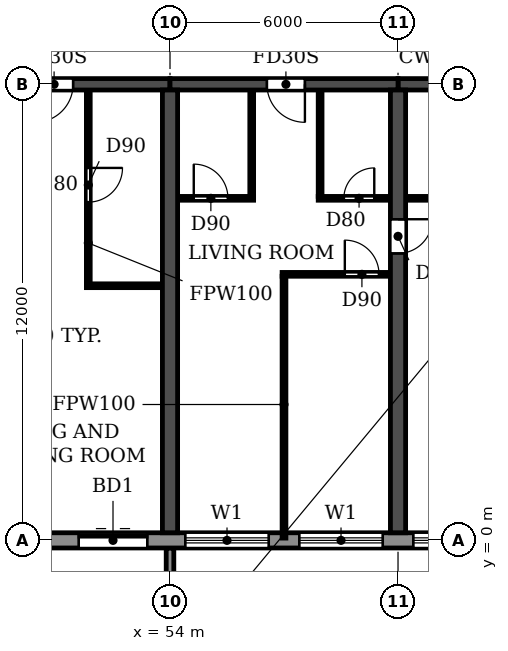
"""IFC4 building model, lengths in metres.
Left out: names, types, materials, properties, quantities, classifications, styles, units other than length and angle.
Written with IfcOpenShell. Run it as: python <this file> out.ifc"""

import sys

from ifc_helpers import new_model, si_unit, direction, frame, frame_2d, origin, place, context, subcontext, project, spatial, polyline, rectangle, outline, extrude, source, transform, mapped, element, fill, save


model = new_model("IFC4")
c1 = context("Model", 3, precision=1e-05, world=origin(), true_north=direction((0.0, 1.0)))
c2 = subcontext(c1, "Body", "Model", "MODEL_VIEW")
j1 = project(units=[si_unit("LENGTHUNIT", "METRE"), si_unit("PLANEANGLEUNIT", "RADIAN")], contexts=[c1])
p1 = place(None, origin())
s1 = spatial("IfcSite", under=j1, at=p1, CompositionType="ELEMENT")
p2 = place(p1, origin())
s2 = spatial("IfcBuilding", under=s1, at=p2, CompositionType="ELEMENT")
p3 = place(p2, frame((0.0, 0.0, 56.4)))
s3 = spatial("IfcBuildingStorey", under=s2, at=p3, CompositionType="ELEMENT", Elevation=56.4)
p4 = place(p3, frame((54.0, 0.2, 0.0), z_axis=(0.0, 0.0, 1.0), x_axis=(0.0, 1.0, 0.0)))
e1 = element("IfcWall", 1, at=p4, inside=s3, PredefinedType="SHEAR", context=c2, shape_type="SweptSolid", body=[
    extrude(rectangle(XDim=11.65, YDim=0.4, at=frame_2d((5.825, 0.0))), origin(), (0.0, 0.0, 1.0), 3.05),
])
p5 = place(p3, frame((60.0, 0.2, 0.0), z_axis=(0.0, 0.0, 1.0), x_axis=(0.0, 1.0, 0.0)))
e2 = element("IfcWall", 2, at=p5, inside=s3, PredefinedType="SHEAR", context=c2, shape_type="SweptSolid", body=[
    extrude(rectangle(XDim=11.65, YDim=0.4, at=frame_2d((5.825, 0.0))), origin(), (0.0, 0.0, 1.0), 3.05),
])
p6 = place(p5, frame((7.35, 0.0, 0.0)))
e3 = element("IfcOpeningElement", 3, at=p6, cuts=e2, PredefinedType="OPENING", context=c2, shape_type="SweptSolid", body=[
    extrude(rectangle(XDim=0.9, YDim=2.1, at=frame_2d((0.45, 1.05))), frame((0.0, 0.21, 0.0), z_axis=(0.0, -1.0, 0.0), x_axis=(1.0, 0.0, 0.0)), (0.0, 0.0, 1.0), 0.42),
])
p7 = place(p3, frame((48.0, 12.0, 0.0), z_axis=(0.0, 0.0, 1.0), x_axis=(1.0, 0.0, 0.0)))
e4 = element("IfcWall", 4, at=p7, inside=s3, PredefinedType="SHEAR", context=c2, shape_type="SweptSolid", body=[
    extrude(rectangle(XDim=6.0, YDim=0.3, at=frame_2d((3.0, 0.0))), origin(), (0.0, 0.0, 1.0), 2.45),
])
p8 = place(p7, frame((2.45, 0.0, 0.0)))
e5 = element("IfcOpeningElement", 5, at=p8, cuts=e4, PredefinedType="OPENING", context=c2, shape_type="SweptSolid", body=[
    extrude(rectangle(XDim=1.0, YDim=2.1, at=frame_2d((0.5, 1.05))), frame((0.0, 0.16, 0.0), z_axis=(0.0, -1.0, 0.0), x_axis=(1.0, 0.0, 0.0)), (0.0, 0.0, 1.0), 0.32),
])
p9 = place(p3, frame((54.0, 12.0, 0.0), z_axis=(0.0, 0.0, 1.0), x_axis=(1.0, 0.0, 0.0)))
e6 = element("IfcWall", 6, at=p9, inside=s3, PredefinedType="SHEAR", context=c2, shape_type="SweptSolid", body=[
    extrude(rectangle(XDim=6.0, YDim=0.3, at=frame_2d((3.0, 0.0))), origin(), (0.0, 0.0, 1.0), 2.45),
])
p10 = place(p9, frame((2.55, 0.0, 0.0)))
e7 = element("IfcOpeningElement", 7, at=p10, cuts=e6, PredefinedType="OPENING", context=c2, shape_type="SweptSolid", body=[
    extrude(rectangle(XDim=1.0, YDim=2.1, at=frame_2d((0.5, 1.05))), frame((0.0, 0.16, 0.0), z_axis=(0.0, -1.0, 0.0), x_axis=(1.0, 0.0, 0.0)), (0.0, 0.0, 1.0), 0.32),
])
p11 = place(p3, frame((60.0, 12.0, 0.0), z_axis=(0.0, 0.0, 1.0), x_axis=(1.0, 0.0, 0.0)))
e8 = element("IfcWall", 8, at=p11, inside=s3, PredefinedType="SHEAR", context=c2, shape_type="SweptSolid", body=[
    extrude(rectangle(XDim=6.0, YDim=0.3, at=frame_2d((3.0, 0.0))), origin(), (0.0, 0.0, 1.0), 2.45),
])
p12 = place(p3, frame((10.683, 0.0, 0.0), z_axis=(0.0, 0.0, 1.0), x_axis=(1.0, 0.0, 0.0)))
e9 = element("IfcWall", 9, at=p12, inside=s3, PredefinedType="STANDARD", context=c2, shape_type="SweptSolid", body=[
    extrude(rectangle(XDim=80.634, YDim=0.4, at=frame_2d((40.317, 0.0))), origin(), (0.0, 0.0, 1.0), 3.05),
])
p13 = place(p12, frame((1.717, 0.0, 0.9)))
e10 = element("IfcOpeningElement", 10, at=p13, cuts=e9, PredefinedType="OPENING", context=c2, shape_type="SweptSolid", body=[
    extrude(rectangle(XDim=2.2, YDim=1.5, at=frame_2d((1.1, 0.75))), frame((0.0, 0.21, 0.0), z_axis=(0.0, -1.0, 0.0), x_axis=(1.0, 0.0, 0.0)), (0.0, 0.0, 1.0), 0.42),
])
p14 = place(p12, frame((4.917, 0.0, 0.0)))
e11 = element("IfcOpeningElement", 11, at=p14, cuts=e9, PredefinedType="OPENING", context=c2, shape_type="SweptSolid", body=[
    extrude(rectangle(XDim=1.8, YDim=2.4, at=frame_2d((0.9, 1.2))), frame((0.0, 0.21, 0.0), z_axis=(0.0, -1.0, 0.0), x_axis=(1.0, 0.0, 0.0)), (0.0, 0.0, 1.0), 0.42),
])
p15 = place(p12, frame((7.717, 0.0, 0.9)))
e12 = element("IfcOpeningElement", 12, at=p15, cuts=e9, PredefinedType="OPENING", context=c2, shape_type="SweptSolid", body=[
    extrude(rectangle(XDim=2.2, YDim=1.5, at=frame_2d((1.1, 0.75))), frame((0.0, 0.21, 0.0), z_axis=(0.0, -1.0, 0.0), x_axis=(1.0, 0.0, 0.0)), (0.0, 0.0, 1.0), 0.42),
])
p16 = place(p12, frame((10.717, 0.0, 0.9)))
e13 = element("IfcOpeningElement", 13, at=p16, cuts=e9, PredefinedType="OPENING", context=c2, shape_type="SweptSolid", body=[
    extrude(rectangle(XDim=2.2, YDim=1.5, at=frame_2d((1.1, 0.75))), frame((0.0, 0.21, 0.0), z_axis=(0.0, -1.0, 0.0), x_axis=(1.0, 0.0, 0.0)), (0.0, 0.0, 1.0), 0.42),
])
p17 = place(p12, frame((13.717, 0.0, 0.9)))
e14 = element("IfcOpeningElement", 14, at=p17, cuts=e9, PredefinedType="OPENING", context=c2, shape_type="SweptSolid", body=[
    extrude(rectangle(XDim=2.2, YDim=1.5, at=frame_2d((1.1, 0.75))), frame((0.0, 0.21, 0.0), z_axis=(0.0, -1.0, 0.0), x_axis=(1.0, 0.0, 0.0)), (0.0, 0.0, 1.0), 0.42),
])
p18 = place(p12, frame((16.917, 0.0, 0.0)))
e15 = element("IfcOpeningElement", 15, at=p18, cuts=e9, PredefinedType="OPENING", context=c2, shape_type="SweptSolid", body=[
    extrude(rectangle(XDim=1.8, YDim=2.4, at=frame_2d((0.9, 1.2))), frame((0.0, 0.21, 0.0), z_axis=(0.0, -1.0, 0.0), x_axis=(1.0, 0.0, 0.0)), (0.0, 0.0, 1.0), 0.42),
])
p19 = place(p12, frame((19.717, 0.0, 0.9)))
e16 = element("IfcOpeningElement", 16, at=p19, cuts=e9, PredefinedType="OPENING", context=c2, shape_type="SweptSolid", body=[
    extrude(rectangle(XDim=2.2, YDim=1.5, at=frame_2d((1.1, 0.75))), frame((0.0, 0.21, 0.0), z_axis=(0.0, -1.0, 0.0), x_axis=(1.0, 0.0, 0.0)), (0.0, 0.0, 1.0), 0.42),
])
p20 = place(p12, frame((22.717, 0.0, 0.9)))
e17 = element("IfcOpeningElement", 17, at=p20, cuts=e9, PredefinedType="OPENING", context=c2, shape_type="SweptSolid", body=[
    extrude(rectangle(XDim=2.2, YDim=1.5, at=frame_2d((1.1, 0.75))), frame((0.0, 0.21, 0.0), z_axis=(0.0, -1.0, 0.0), x_axis=(1.0, 0.0, 0.0)), (0.0, 0.0, 1.0), 0.42),
])
p21 = place(p12, frame((25.917, 0.0, 0.0)))
e18 = element("IfcOpeningElement", 18, at=p21, cuts=e9, PredefinedType="OPENING", context=c2, shape_type="SweptSolid", body=[
    extrude(rectangle(XDim=1.8, YDim=2.4, at=frame_2d((0.9, 1.2))), frame((0.0, 0.21, 0.0), z_axis=(0.0, -1.0, 0.0), x_axis=(1.0, 0.0, 0.0)), (0.0, 0.0, 1.0), 0.42),
])
p22 = place(p12, frame((28.717, 0.0, 0.9)))
e19 = element("IfcOpeningElement", 19, at=p22, cuts=e9, PredefinedType="OPENING", context=c2, shape_type="SweptSolid", body=[
    extrude(rectangle(XDim=2.2, YDim=1.5, at=frame_2d((1.1, 0.75))), frame((0.0, 0.21, 0.0), z_axis=(0.0, -1.0, 0.0), x_axis=(1.0, 0.0, 0.0)), (0.0, 0.0, 1.0), 0.42),
])
p23 = place(p12, frame((31.717, 0.0, 0.9)))
e20 = element("IfcOpeningElement", 20, at=p23, cuts=e9, PredefinedType="OPENING", context=c2, shape_type="SweptSolid", body=[
    extrude(rectangle(XDim=2.2, YDim=1.5, at=frame_2d((1.1, 0.75))), frame((0.0, 0.21, 0.0), z_axis=(0.0, -1.0, 0.0), x_axis=(1.0, 0.0, 0.0)), (0.0, 0.0, 1.0), 0.42),
])
p24 = place(p12, frame((34.717, 0.0, 0.9)))
e21 = element("IfcOpeningElement", 21, at=p24, cuts=e9, PredefinedType="OPENING", context=c2, shape_type="SweptSolid", body=[
    extrude(rectangle(XDim=2.2, YDim=1.5, at=frame_2d((1.1, 0.75))), frame((0.0, 0.21, 0.0), z_axis=(0.0, -1.0, 0.0), x_axis=(1.0, 0.0, 0.0)), (0.0, 0.0, 1.0), 0.42),
])
p25 = place(p12, frame((37.717, 0.0, 0.9)))
e22 = element("IfcOpeningElement", 22, at=p25, cuts=e9, PredefinedType="OPENING", context=c2, shape_type="SweptSolid", body=[
    extrude(rectangle(XDim=2.2, YDim=1.5, at=frame_2d((1.1, 0.75))), frame((0.0, 0.21, 0.0), z_axis=(0.0, -1.0, 0.0), x_axis=(1.0, 0.0, 0.0)), (0.0, 0.0, 1.0), 0.42),
])
p26 = place(p12, frame((40.917, 0.0, 0.0)))
e23 = element("IfcOpeningElement", 23, at=p26, cuts=e9, PredefinedType="OPENING", context=c2, shape_type="SweptSolid", body=[
    extrude(rectangle(XDim=1.8, YDim=2.4, at=frame_2d((0.9, 1.2))), frame((0.0, 0.21, 0.0), z_axis=(0.0, -1.0, 0.0), x_axis=(1.0, 0.0, 0.0)), (0.0, 0.0, 1.0), 0.42),
])
p27 = place(p12, frame((43.717, 0.0, 0.9)))
e24 = element("IfcOpeningElement", 24, at=p27, cuts=e9, PredefinedType="OPENING", context=c2, shape_type="SweptSolid", body=[
    extrude(rectangle(XDim=2.2, YDim=1.5, at=frame_2d((1.1, 0.75))), frame((0.0, 0.21, 0.0), z_axis=(0.0, -1.0, 0.0), x_axis=(1.0, 0.0, 0.0)), (0.0, 0.0, 1.0), 0.42),
])
p28 = place(p12, frame((46.717, 0.0, 0.9)))
e25 = element("IfcOpeningElement", 25, at=p28, cuts=e9, PredefinedType="OPENING", context=c2, shape_type="SweptSolid", body=[
    extrude(rectangle(XDim=2.2, YDim=1.5, at=frame_2d((1.1, 0.75))), frame((0.0, 0.21, 0.0), z_axis=(0.0, -1.0, 0.0), x_axis=(1.0, 0.0, 0.0)), (0.0, 0.0, 1.0), 0.42),
])
p29 = place(p12, frame((49.717, 0.0, 0.9)))
e26 = element("IfcOpeningElement", 26, at=p29, cuts=e9, PredefinedType="OPENING", context=c2, shape_type="SweptSolid", body=[
    extrude(rectangle(XDim=2.2, YDim=1.5, at=frame_2d((1.1, 0.75))), frame((0.0, 0.21, 0.0), z_axis=(0.0, -1.0, 0.0), x_axis=(1.0, 0.0, 0.0)), (0.0, 0.0, 1.0), 0.42),
])
p30 = place(p12, frame((52.717, 0.0, 0.9)))
e27 = element("IfcOpeningElement", 27, at=p30, cuts=e9, PredefinedType="OPENING", context=c2, shape_type="SweptSolid", body=[
    extrude(rectangle(XDim=2.2, YDim=1.5, at=frame_2d((1.1, 0.75))), frame((0.0, 0.21, 0.0), z_axis=(0.0, -1.0, 0.0), x_axis=(1.0, 0.0, 0.0)), (0.0, 0.0, 1.0), 0.42),
])
p31 = place(p12, frame((55.717, 0.0, 0.9)))
e28 = element("IfcOpeningElement", 28, at=p31, cuts=e9, PredefinedType="OPENING", context=c2, shape_type="SweptSolid", body=[
    extrude(rectangle(XDim=2.2, YDim=1.5, at=frame_2d((1.1, 0.75))), frame((0.0, 0.21, 0.0), z_axis=(0.0, -1.0, 0.0), x_axis=(1.0, 0.0, 0.0)), (0.0, 0.0, 1.0), 0.42),
])
p32 = place(p12, frame((58.717, 0.0, 0.9)))
e29 = element("IfcOpeningElement", 29, at=p32, cuts=e9, PredefinedType="OPENING", context=c2, shape_type="SweptSolid", body=[
    extrude(rectangle(XDim=2.2, YDim=1.5, at=frame_2d((1.1, 0.75))), frame((0.0, 0.21, 0.0), z_axis=(0.0, -1.0, 0.0), x_axis=(1.0, 0.0, 0.0)), (0.0, 0.0, 1.0), 0.42),
])
p33 = place(p12, frame((61.717, 0.0, 0.9)))
e30 = element("IfcOpeningElement", 30, at=p33, cuts=e9, PredefinedType="OPENING", context=c2, shape_type="SweptSolid", body=[
    extrude(rectangle(XDim=2.2, YDim=1.5, at=frame_2d((1.1, 0.75))), frame((0.0, 0.21, 0.0), z_axis=(0.0, -1.0, 0.0), x_axis=(1.0, 0.0, 0.0)), (0.0, 0.0, 1.0), 0.42),
])
p34 = place(p12, frame((64.917, 0.0, 0.0)))
e31 = element("IfcOpeningElement", 31, at=p34, cuts=e9, PredefinedType="OPENING", context=c2, shape_type="SweptSolid", body=[
    extrude(rectangle(XDim=1.8, YDim=2.4, at=frame_2d((0.9, 1.2))), frame((0.0, 0.21, 0.0), z_axis=(0.0, -1.0, 0.0), x_axis=(1.0, 0.0, 0.0)), (0.0, 0.0, 1.0), 0.42),
])
p35 = place(p12, frame((67.717, 0.0, 0.9)))
e32 = element("IfcOpeningElement", 32, at=p35, cuts=e9, PredefinedType="OPENING", context=c2, shape_type="SweptSolid", body=[
    extrude(rectangle(XDim=2.2, YDim=1.5, at=frame_2d((1.1, 0.75))), frame((0.0, 0.21, 0.0), z_axis=(0.0, -1.0, 0.0), x_axis=(1.0, 0.0, 0.0)), (0.0, 0.0, 1.0), 0.42),
])
p36 = place(p12, frame((70.717, 0.0, 0.9)))
e33 = element("IfcOpeningElement", 33, at=p36, cuts=e9, PredefinedType="OPENING", context=c2, shape_type="SweptSolid", body=[
    extrude(rectangle(XDim=2.2, YDim=1.5, at=frame_2d((1.1, 0.75))), frame((0.0, 0.21, 0.0), z_axis=(0.0, -1.0, 0.0), x_axis=(1.0, 0.0, 0.0)), (0.0, 0.0, 1.0), 0.42),
])
p37 = place(p12, frame((73.717, 0.0, 0.9)))
e34 = element("IfcOpeningElement", 34, at=p37, cuts=e9, PredefinedType="OPENING", context=c2, shape_type="SweptSolid", body=[
    extrude(rectangle(XDim=2.2, YDim=1.5, at=frame_2d((1.1, 0.75))), frame((0.0, 0.21, 0.0), z_axis=(0.0, -1.0, 0.0), x_axis=(1.0, 0.0, 0.0)), (0.0, 0.0, 1.0), 0.42),
])
p38 = place(p12, frame((76.917, 0.0, 0.0)))
e35 = element("IfcOpeningElement", 35, at=p38, cuts=e9, PredefinedType="OPENING", context=c2, shape_type="SweptSolid", body=[
    extrude(rectangle(XDim=1.8, YDim=2.4, at=frame_2d((0.9, 1.2))), frame((0.0, 0.21, 0.0), z_axis=(0.0, -1.0, 0.0), x_axis=(1.0, 0.0, 0.0)), (0.0, 0.0, 1.0), 0.42),
])
m1 = source(origin(), c2, "Body", "SweptSolid", [
    extrude(outline(polyline([(0.0, 0.0), (0.2, 0.0), (0.2, 1.65), (0.0, 1.65), (0.0, 0.0)])), origin(), (0.0, 0.0, 1.0), 3.1),
])
p39 = place(p3, frame((53.9, -1.85, 0.0)))
e36 = element("IfcWall", 36, at=p39, inside=s3, PredefinedType="STANDARD", context=c2, shape_type="MappedRepresentation", body=[
    mapped(m1, transform((0.0, 0.0, 0.0))),
])
p40 = place(p3, frame((51.8, 6.7, 0.0), z_axis=(0.0, 0.0, 1.0), x_axis=(1.0, 0.0, 0.0)))
e37 = element("IfcWall", 37, at=p40, inside=s3, PredefinedType="PARTITIONING", context=c2, shape_type="SweptSolid", body=[
    extrude(rectangle(XDim=1.99, YDim=0.1, at=frame_2d((0.995, 0.0))), origin(), (0.0, 0.0, 1.0), 3.05),
])
p41 = place(p3, frame((56.95, 7.0, 0.0), z_axis=(0.0, 0.0, 1.0), x_axis=(1.0, 0.0, 0.0)))
e38 = element("IfcWall", 38, at=p41, inside=s3, PredefinedType="PARTITIONING", context=c2, shape_type="SweptSolid", body=[
    extrude(rectangle(XDim=2.84, YDim=0.1, at=frame_2d((1.42, 0.0))), origin(), (0.0, 0.0, 1.0), 3.05),
])
p42 = place(p41, frame((1.65, 0.0, 0.0)))
e39 = element("IfcOpeningElement", 39, at=p42, cuts=e38, PredefinedType="OPENING", context=c2, shape_type="SweptSolid", body=[
    extrude(rectangle(XDim=0.9, YDim=2.1, at=frame_2d((0.45, 1.05))), frame((0.0, 0.06, 0.0), z_axis=(0.0, -1.0, 0.0), x_axis=(1.0, 0.0, 0.0)), (0.0, 0.0, 1.0), 0.12),
])
p43 = place(p3, frame((54.21, 9.0, 0.0), z_axis=(0.0, 0.0, 1.0), x_axis=(1.0, 0.0, 0.0)))
e40 = element("IfcWall", 40, at=p43, inside=s3, PredefinedType="PARTITIONING", context=c2, shape_type="SweptSolid", body=[
    extrude(rectangle(XDim=1.99, YDim=0.1, at=frame_2d((0.995, 0.0))), origin(), (0.0, 0.0, 1.0), 3.05),
])
p44 = place(p43, frame((0.415, 0.0, 0.0)))
e41 = element("IfcOpeningElement", 41, at=p44, cuts=e40, PredefinedType="OPENING", context=c2, shape_type="SweptSolid", body=[
    extrude(rectangle(XDim=0.9, YDim=2.1, at=frame_2d((0.45, 1.05))), frame((0.0, 0.06, 0.0), z_axis=(0.0, -1.0, 0.0), x_axis=(1.0, 0.0, 0.0)), (0.0, 0.0, 1.0), 0.12),
])
p45 = place(p3, frame((57.9, 9.0, 0.0), z_axis=(0.0, 0.0, 1.0), x_axis=(1.0, 0.0, 0.0)))
e42 = element("IfcWall", 42, at=p45, inside=s3, PredefinedType="PARTITIONING", context=c2, shape_type="SweptSolid", body=[
    extrude(rectangle(XDim=1.89, YDim=0.1, at=frame_2d((0.945, 0.0))), origin(), (0.0, 0.0, 1.0), 3.05),
])
p46 = place(p45, frame((0.675, 0.0, 0.0)))
e43 = element("IfcOpeningElement", 43, at=p46, cuts=e42, PredefinedType="OPENING", context=c2, shape_type="SweptSolid", body=[
    extrude(rectangle(XDim=0.8, YDim=2.1, at=frame_2d((0.4, 1.05))), frame((0.0, 0.06, 0.0), z_axis=(0.0, -1.0, 0.0), x_axis=(1.0, 0.0, 0.0)), (0.0, 0.0, 1.0), 0.12),
])
p47 = place(p3, frame((60.21, 9.0, 0.0), z_axis=(0.0, 0.0, 1.0), x_axis=(1.0, 0.0, 0.0)))
e44 = element("IfcWall", 44, at=p47, inside=s3, PredefinedType="PARTITIONING", context=c2, shape_type="SweptSolid", body=[
    extrude(rectangle(XDim=2.69, YDim=0.1, at=frame_2d((1.345, 0.0))), origin(), (0.0, 0.0, 1.0), 3.05),
])
p48 = place(p47, frame((0.89, 0.0, 0.0)))
e45 = element("IfcOpeningElement", 45, at=p48, cuts=e44, PredefinedType="OPENING", context=c2, shape_type="SweptSolid", body=[
    extrude(rectangle(XDim=0.8, YDim=2.1, at=frame_2d((0.4, 1.05))), frame((0.0, 0.06, 0.0), z_axis=(0.0, -1.0, 0.0), x_axis=(1.0, 0.0, 0.0)), (0.0, 0.0, 1.0), 0.12),
])
p49 = place(p3, frame((51.85, 6.75, 0.0), z_axis=(0.0, 0.0, 1.0), x_axis=(0.0, 1.0, 0.0)))
e46 = element("IfcWall", 46, at=p49, inside=s3, PredefinedType="PARTITIONING", context=c2, shape_type="SweptSolid", body=[
    extrude(rectangle(XDim=5.09, YDim=0.1, at=frame_2d((2.545, 0.0))), origin(), (0.0, 0.0, 1.0), 3.05),
])
p50 = place(p49, frame((2.15, 0.0, 0.0)))
e47 = element("IfcOpeningElement", 47, at=p50, cuts=e46, PredefinedType="OPENING", context=c2, shape_type="SweptSolid", body=[
    extrude(rectangle(XDim=0.9, YDim=2.1, at=frame_2d((0.45, 1.05))), frame((0.0, 0.06, 0.0), z_axis=(0.0, -1.0, 0.0), x_axis=(1.0, 0.0, 0.0)), (0.0, 0.0, 1.0), 0.12),
])
p51 = place(p3, frame((56.15, 9.05, 0.0), z_axis=(0.0, 0.0, 1.0), x_axis=(0.0, 1.0, 0.0)))
e48 = element("IfcWall", 48, at=p51, inside=s3, PredefinedType="PARTITIONING", context=c2, shape_type="SweptSolid", body=[
    extrude(rectangle(XDim=2.79, YDim=0.1, at=frame_2d((1.395, 0.0))), origin(), (0.0, 0.0, 1.0), 3.05),
])
p52 = place(p3, frame((57.0, 0.06, 0.0), z_axis=(0.0, 0.0, 1.0), x_axis=(0.0, 1.0, 0.0)))
e49 = element("IfcWall", 49, at=p52, inside=s3, PredefinedType="PARTITIONING", context=c2, shape_type="SweptSolid", body=[
    extrude(rectangle(XDim=6.89, YDim=0.1, at=frame_2d((3.445, 0.0))), origin(), (0.0, 0.0, 1.0), 3.05),
])
p53 = place(p3, frame((57.95, 9.05, 0.0), z_axis=(0.0, 0.0, 1.0), x_axis=(0.0, 1.0, 0.0)))
e50 = element("IfcWall", 50, at=p53, inside=s3, PredefinedType="PARTITIONING", context=c2, shape_type="SweptSolid", body=[
    extrude(rectangle(XDim=2.79, YDim=0.1, at=frame_2d((1.395, 0.0))), origin(), (0.0, 0.0, 1.0), 3.05),
])
p54 = place(p26, origin())
e51 = element("IfcDoor", 51, at=p54, inside=s3, OperationType="DOUBLE_DOOR_SLIDING", PredefinedType="DOOR", context=c2, shape_type="SweptSolid", body=[
    extrude(rectangle(XDim=1.8, YDim=2.4, at=frame_2d((0.9, 1.2))), frame((0.0, 0.025, 0.0), z_axis=(0.0, -1.0, 0.0), x_axis=(1.0, 0.0, 0.0)), (0.0, 0.0, 1.0), 0.05),
])
fill(e23, e51)
p55 = place(p27, origin())
e52 = element("IfcWindow", 52, at=p55, inside=s3, PartitioningType="DOUBLE_PANEL_HORIZONTAL", PredefinedType="WINDOW", context=c2, shape_type="SweptSolid", body=[
    extrude(rectangle(XDim=2.2, YDim=1.5, at=frame_2d((1.1, 0.75))), frame((0.0, 0.03, 0.0), z_axis=(0.0, -1.0, 0.0), x_axis=(1.0, 0.0, 0.0)), (0.0, 0.0, 1.0), 0.06),
])
fill(e24, e52)
p56 = place(p28, origin())
e53 = element("IfcWindow", 53, at=p56, inside=s3, PartitioningType="DOUBLE_PANEL_HORIZONTAL", PredefinedType="WINDOW", context=c2, shape_type="SweptSolid", body=[
    extrude(rectangle(XDim=2.2, YDim=1.5, at=frame_2d((1.1, 0.75))), frame((0.0, 0.03, 0.0), z_axis=(0.0, -1.0, 0.0), x_axis=(1.0, 0.0, 0.0)), (0.0, 0.0, 1.0), 0.06),
])
fill(e25, e53)
p57 = place(p29, origin())
e54 = element("IfcWindow", 54, at=p57, inside=s3, PartitioningType="DOUBLE_PANEL_HORIZONTAL", PredefinedType="WINDOW", context=c2, shape_type="SweptSolid", body=[
    extrude(rectangle(XDim=2.2, YDim=1.5, at=frame_2d((1.1, 0.75))), frame((0.0, 0.03, 0.0), z_axis=(0.0, -1.0, 0.0), x_axis=(1.0, 0.0, 0.0)), (0.0, 0.0, 1.0), 0.06),
])
fill(e26, e54)
p58 = place(p8, frame((1.0, 0.0, 0.0), z_axis=(0.0, 0.0, 1.0), x_axis=(-1.0, 0.0, 0.0)))
e55 = element("IfcDoor", 55, at=p58, inside=s3, OperationType="SINGLE_SWING_RIGHT", PredefinedType="DOOR", context=c2, shape_type="SweptSolid", body=[
    extrude(rectangle(XDim=1.0, YDim=2.1, at=frame_2d((0.5, 1.05))), frame((0.0, 0.025, 0.0), z_axis=(0.0, -1.0, 0.0), x_axis=(1.0, 0.0, 0.0)), (0.0, 0.0, 1.0), 0.05),
])
fill(e5, e55)
p59 = place(p50, frame((0.9, 0.0, 0.0), z_axis=(0.0, 0.0, 1.0), x_axis=(-1.0, 0.0, 0.0)))
e56 = element("IfcDoor", 56, at=p59, inside=s3, OperationType="SINGLE_SWING_LEFT", PredefinedType="DOOR", context=c2, shape_type="SweptSolid", body=[
    extrude(rectangle(XDim=0.9, YDim=2.1, at=frame_2d((0.45, 1.05))), frame((0.0, 0.025, 0.0), z_axis=(0.0, -1.0, 0.0), x_axis=(1.0, 0.0, 0.0)), (0.0, 0.0, 1.0), 0.05),
])
fill(e47, e56)
p60 = place(p44, origin())
e57 = element("IfcDoor", 57, at=p60, inside=s3, OperationType="SINGLE_SWING_LEFT", PredefinedType="DOOR", context=c2, shape_type="SweptSolid", body=[
    extrude(rectangle(XDim=0.9, YDim=2.1, at=frame_2d((0.45, 1.05))), frame((0.0, 0.025, 0.0), z_axis=(0.0, -1.0, 0.0), x_axis=(1.0, 0.0, 0.0)), (0.0, 0.0, 1.0), 0.05),
])
fill(e41, e57)
p61 = place(p10, frame((1.0, 0.0, 0.0), z_axis=(0.0, 0.0, 1.0), x_axis=(-1.0, 0.0, 0.0)))
e58 = element("IfcDoor", 58, at=p61, inside=s3, OperationType="SINGLE_SWING_LEFT", PredefinedType="DOOR", context=c2, shape_type="SweptSolid", body=[
    extrude(rectangle(XDim=1.0, YDim=2.1, at=frame_2d((0.5, 1.05))), frame((0.0, 0.025, 0.0), z_axis=(0.0, -1.0, 0.0), x_axis=(1.0, 0.0, 0.0)), (0.0, 0.0, 1.0), 0.05),
])
fill(e7, e58)
p62 = place(p46, origin())
e59 = element("IfcDoor", 59, at=p62, inside=s3, OperationType="SINGLE_SWING_RIGHT", PredefinedType="DOOR", context=c2, shape_type="SweptSolid", body=[
    extrude(rectangle(XDim=0.8, YDim=2.1, at=frame_2d((0.4, 1.05))), frame((0.0, 0.025, 0.0), z_axis=(0.0, -1.0, 0.0), x_axis=(1.0, 0.0, 0.0)), (0.0, 0.0, 1.0), 0.05),
])
fill(e43, e59)
p63 = place(p42, origin())
e60 = element("IfcDoor", 60, at=p63, inside=s3, OperationType="SINGLE_SWING_LEFT", PredefinedType="DOOR", context=c2, shape_type="SweptSolid", body=[
    extrude(rectangle(XDim=0.9, YDim=2.1, at=frame_2d((0.45, 1.05))), frame((0.0, 0.025, 0.0), z_axis=(0.0, -1.0, 0.0), x_axis=(1.0, 0.0, 0.0)), (0.0, 0.0, 1.0), 0.05),
])
fill(e39, e60)
p64 = place(p6, frame((0.9, 0.0, 0.0), z_axis=(0.0, 0.0, 1.0), x_axis=(-1.0, 0.0, 0.0)))
e61 = element("IfcDoor", 61, at=p64, inside=s3, OperationType="SINGLE_SWING_LEFT", PredefinedType="DOOR", context=c2, shape_type="SweptSolid", body=[
    extrude(rectangle(XDim=0.9, YDim=2.1, at=frame_2d((0.45, 1.05))), frame((0.0, 0.025, 0.0), z_axis=(0.0, -1.0, 0.0), x_axis=(1.0, 0.0, 0.0)), (0.0, 0.0, 1.0), 0.05),
])
fill(e3, e61)
save(model, sys.argv[1])
